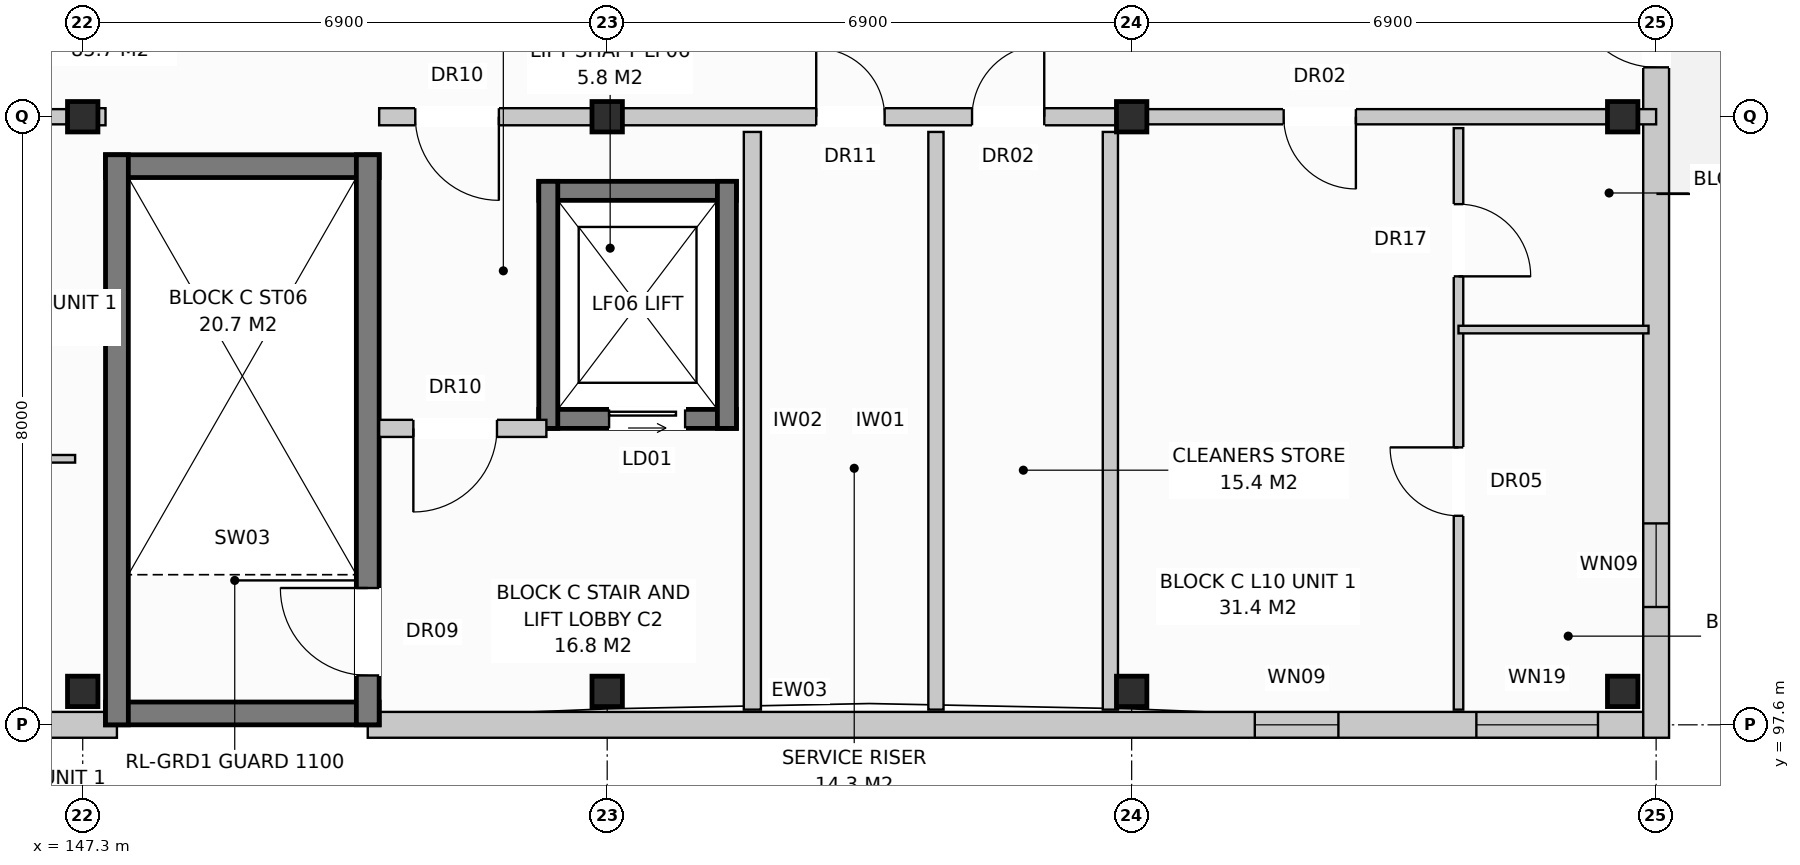
"""IFC4 building model, lengths in metres.
Left out: names, types, materials, properties, quantities, classifications, styles, units other than length and angle.
Written with IfcOpenShell. Run it as: python <this file> out.ifc"""

import sys

from ifc_helpers import new_model, si_unit, direction, frame, frame_2d, origin, origin_with_axes, origin_2d, place, context, subcontext, project, spatial, rectangle, extrude, element, fill, save


model = new_model("IFC4")
c1 = context("Model", 3, precision=1e-05, world=origin(), true_north=direction((0.0, 1.0)))
c2 = subcontext(c1, "Body", "Model", "MODEL_VIEW")
j1 = project(units=[si_unit("LENGTHUNIT", "METRE"), si_unit("PLANEANGLEUNIT", "RADIAN")], contexts=[c1])
p1 = place(None, origin())
s1 = spatial("IfcSite", under=j1, at=p1, CompositionType="ELEMENT")
p2 = place(p1, origin())
s2 = spatial("IfcBuilding", under=s1, at=p2, CompositionType="ELEMENT")
p3 = place(p2, frame((0.0, 0.0, 33.6)))
s3 = spatial("IfcBuildingStorey", under=s2, at=p3, CompositionType="ELEMENT", Elevation=33.6)
for number, where, z_axis, x_axis in (
    (1, (147.3, 98.04, 0.0), (0.0, 0.0, 1.0), (1.0, 0.0, 0.0)),
    (2, (147.3, 105.6, 0.0), (0.0, 0.0, 1.0), (1.0, 0.0, 0.0)),
    (3, (154.2, 98.04, 0.0), (0.0, 0.0, 1.0), (1.0, 0.0, 0.0)),
    (4, (154.2, 105.6, 0.0), (0.0, 0.0, 1.0), (1.0, 0.0, 0.0)),
    (5, (161.1, 98.04, 0.0), (0.0, 0.0, 1.0), (1.0, 0.0, 0.0)),
    (6, (161.1, 105.6, 0.0), (0.0, 0.0, 1.0), (1.0, 0.0, 0.0)),
    (7, (167.56, 98.04, 0.0), (0.0, 0.0, 1.0), (1.0, 0.0, 0.0)),
    (8, (167.56, 105.6, 0.0), (0.0, 0.0, 1.0), (1.0, 0.0, 0.0)),
):
    element("IfcColumn", number, at=place(p3, frame(where, z_axis=z_axis, x_axis=x_axis)), inside=s3, PredefinedType="COLUMN", context=c2, shape_type="SweptSolid", body=[
        extrude(rectangle(XDim=0.4, YDim=0.4, at=origin_2d()), origin(), (0.0, 0.0, 1.0), 3.2),
    ])
p4 = place(p3, frame((130.35, 97.6, 0.0), z_axis=(0.0, 0.0, 1.0), x_axis=(1.0, 0.0, 0.0)))
e9 = element("IfcWall", 9, at=p4, inside=s3, PredefinedType="STANDARD", context=c2, shape_type="SweptSolid", body=[
    extrude(rectangle(XDim=17.4, YDim=0.34, at=frame_2d((8.7, 0.0))), origin(), (0.0, 0.0, 1.0), 2.91),
])
p5 = place(p4, frame((11.844, 0.0, 0.0)))
e10 = element("IfcOpeningElement", 10, at=p5, cuts=e9, PredefinedType="OPENING", context=c2, shape_type="SweptSolid", body=[
    extrude(rectangle(XDim=1.05, YDim=2.12, at=frame_2d((0.525, 1.06))), frame((0.0, 0.182, 0.0), z_axis=(0.0, -1.0, 0.0), x_axis=(1.0, 0.0, 0.0)), (0.0, 0.0, 1.0), 0.364),
])
p6 = place(p4, frame((10.62, 0.0, 0.9)))
e11 = element("IfcOpeningElement", 11, at=p6, cuts=e9, PredefinedType="OPENING", context=c2, shape_type="SweptSolid", body=[
    extrude(rectangle(XDim=0.95, YDim=1.55, at=frame_2d((0.475, 0.775))), frame((0.0, 0.182, 0.0), z_axis=(0.0, -1.0, 0.0), x_axis=(1.0, 0.0, 0.0)), (0.0, 0.0, 1.0), 0.364),
])
p7 = place(p4, frame((14.87, 0.0, 0.72)))
e12 = element("IfcOpeningElement", 12, at=p7, cuts=e9, PredefinedType="OPENING", context=c2, shape_type="SweptSolid", body=[
    extrude(rectangle(XDim=1.1, YDim=1.5, at=frame_2d((0.55, 0.75))), frame((0.0, 0.182, 0.0), z_axis=(0.0, -1.0, 0.0), x_axis=(1.0, 0.0, 0.0)), (0.0, 0.0, 1.0), 0.364),
])
p8 = place(p3, frame((151.05, 97.6, 0.0), z_axis=(0.0, 0.0, 1.0), x_axis=(1.0, 0.0, 0.0)))
e13 = element("IfcWall", 13, at=p8, inside=s3, PredefinedType="STANDARD", context=c2, shape_type="SweptSolid", body=[
    extrude(rectangle(XDim=16.79, YDim=0.34, at=frame_2d((8.395, 0.0))), origin(), (0.0, 0.0, 1.0), 2.91),
])
p9 = place(p8, frame((11.67, 0.0, 0.72)))
e14 = element("IfcOpeningElement", 14, at=p9, cuts=e13, PredefinedType="OPENING", context=c2, shape_type="SweptSolid", body=[
    extrude(rectangle(XDim=1.1, YDim=1.5, at=frame_2d((0.55, 0.75))), frame((0.0, 0.182, 0.0), z_axis=(0.0, -1.0, 0.0), x_axis=(1.0, 0.0, 0.0)), (0.0, 0.0, 1.0), 0.364),
])
p10 = place(p8, frame((14.585, 0.0, 0.8)))
e15 = element("IfcOpeningElement", 15, at=p10, cuts=e13, PredefinedType="OPENING", context=c2, shape_type="SweptSolid", body=[
    extrude(rectangle(XDim=1.6, YDim=1.85, at=frame_2d((0.8, 0.925))), frame((0.0, 0.182, 0.0), z_axis=(0.0, -1.0, 0.0), x_axis=(1.0, 0.0, 0.0)), (0.0, 0.0, 1.0), 0.364),
])
p11 = place(p3, frame((168.0, 97.43, 0.0), z_axis=(0.0, 0.0, 1.0), x_axis=(0.0, 1.0, 0.0)))
e16 = element("IfcWall", 16, at=p11, inside=s3, PredefinedType="STANDARD", context=c2, shape_type="SweptSolid", body=[
    extrude(rectangle(XDim=18.74, YDim=0.34, at=frame_2d((9.37, 0.0))), origin(), (0.0, 0.0, 1.0), 2.91),
])
p12 = place(p11, frame((8.82, 0.0, 0.0)))
e17 = element("IfcOpeningElement", 17, at=p12, cuts=e16, PredefinedType="OPENING", context=c2, shape_type="SweptSolid", body=[
    extrude(rectangle(XDim=1.1, YDim=2.1, at=frame_2d((0.55, 1.05))), frame((0.0, 0.182, 0.0), z_axis=(0.0, -1.0, 0.0), x_axis=(1.0, 0.0, 0.0)), (0.0, 0.0, 1.0), 0.364),
])
p13 = place(p11, frame((1.72, 0.0, 0.72)))
e18 = element("IfcOpeningElement", 18, at=p13, cuts=e16, PredefinedType="OPENING", context=c2, shape_type="SweptSolid", body=[
    extrude(rectangle(XDim=1.1, YDim=1.5, at=frame_2d((0.55, 0.75))), frame((0.0, 0.182, 0.0), z_axis=(0.0, -1.0, 0.0), x_axis=(1.0, 0.0, 0.0)), (0.0, 0.0, 1.0), 0.364),
])
p14 = place(p11, frame((15.92, 0.0, 0.72)))
e19 = element("IfcOpeningElement", 19, at=p14, cuts=e16, PredefinedType="OPENING", context=c2, shape_type="SweptSolid", body=[
    extrude(rectangle(XDim=1.1, YDim=1.5, at=frame_2d((0.55, 0.75))), frame((0.0, 0.182, 0.0), z_axis=(0.0, -1.0, 0.0), x_axis=(1.0, 0.0, 0.0)), (0.0, 0.0, 1.0), 0.364),
])
for number, where, z_axis, x_axis in (
    (20, (147.6, 97.75, 0.0), (0.0, 0.0, 1.0), (1.0, 0.0, 0.0)),
    (21, (147.6, 104.95, 0.0), (0.0, 0.0, 1.0), (1.0, 0.0, 0.0)),
):
    element("IfcWall", number, at=place(p3, frame(where, z_axis=z_axis, x_axis=x_axis)), inside=s3, PredefinedType="SHEAR", context=c2, shape_type="SweptSolid", body=[
        extrude(rectangle(XDim=3.6, YDim=0.3, at=frame_2d((1.8, 0.0))), origin(), (0.0, 0.0, 1.0), 2.96),
    ])
p15 = place(p3, frame((147.75, 97.6, 0.0), z_axis=(0.0, 0.0, 1.0), x_axis=(0.0, 1.0, 0.0)))
e22 = element("IfcWall", 22, at=p15, inside=s3, PredefinedType="SHEAR", context=c2, shape_type="SweptSolid", body=[
    extrude(rectangle(XDim=7.5, YDim=0.3, at=frame_2d((3.75, 0.0))), origin(), (0.0, 0.0, 1.0), 2.96),
])
p16 = place(p3, frame((151.05, 97.6, 0.0), z_axis=(0.0, 0.0, 1.0), x_axis=(0.0, 1.0, 0.0)))
e23 = element("IfcWall", 23, at=p16, inside=s3, PredefinedType="SHEAR", context=c2, shape_type="SweptSolid", body=[
    extrude(rectangle(XDim=7.5, YDim=0.3, at=frame_2d((3.75, 0.0))), origin(), (0.0, 0.0, 1.0), 2.96),
])
p17 = place(p16, frame((0.65, 0.0, 0.0)))
e24 = element("IfcOpeningElement", 24, at=p17, cuts=e23, PredefinedType="OPENING", context=c2, shape_type="SweptSolid", body=[
    extrude(rectangle(XDim=1.15, YDim=2.15, at=frame_2d((0.575, 1.075))), frame((0.0, 0.162, 0.0), z_axis=(0.0, -1.0, 0.0), x_axis=(1.0, 0.0, 0.0)), (0.0, 0.0, 1.0), 0.324),
])
p18 = place(p3, frame((153.3, 101.625, 0.0), z_axis=(0.0, 0.0, 1.0), x_axis=(1.0, 0.0, 0.0)))
e25 = element("IfcWall", 25, at=p18, inside=s3, PredefinedType="SHEAR", context=c2, shape_type="SweptSolid", body=[
    extrude(rectangle(XDim=2.6, YDim=0.25, at=frame_2d((1.3, 0.0))), origin(), (0.0, 0.0, 1.0), 2.96),
])
p19 = place(p18, frame((0.925, 0.0, 0.0)))
e26 = element("IfcOpeningElement", 26, at=p19, cuts=e25, PredefinedType="OPENING", context=c2, shape_type="SweptSolid", body=[
    extrude(rectangle(XDim=1.0, YDim=2.1, at=frame_2d((0.5, 1.05))), frame((0.0, 0.137, 0.0), z_axis=(0.0, -1.0, 0.0), x_axis=(1.0, 0.0, 0.0)), (0.0, 0.0, 1.0), 0.274),
])
p20 = place(p3, frame((153.3, 104.625, 0.0), z_axis=(0.0, 0.0, 1.0), x_axis=(1.0, 0.0, 0.0)))
e27 = element("IfcWall", 27, at=p20, inside=s3, PredefinedType="SHEAR", context=c2, shape_type="SweptSolid", body=[
    extrude(rectangle(XDim=2.6, YDim=0.25, at=frame_2d((1.3, 0.0))), origin(), (0.0, 0.0, 1.0), 2.96),
])
for number, where, z_axis, x_axis in (
    (28, (153.425, 101.5, 0.0), (0.0, 0.0, 1.0), (0.0, 1.0, 0.0)),
    (29, (155.775, 101.5, 0.0), (0.0, 0.0, 1.0), (0.0, 1.0, 0.0)),
):
    element("IfcWall", number, at=place(p3, frame(where, z_axis=z_axis, x_axis=x_axis)), inside=s3, PredefinedType="SHEAR", context=c2, shape_type="SweptSolid", body=[
        extrude(rectangle(XDim=3.25, YDim=0.25, at=frame_2d((1.625, 0.0))), origin(), (0.0, 0.0, 1.0), 2.96),
    ])
p21 = place(p3, frame((156.11, 97.8, 0.0), z_axis=(0.0, 0.0, 1.0), x_axis=(0.0, 1.0, 0.0)))
e30 = element("IfcWall", 30, at=p21, inside=s3, PredefinedType="PARTITIONING", context=c2, shape_type="SweptSolid", body=[
    extrude(rectangle(XDim=7.6, YDim=0.225, at=frame_2d((3.8, 0.0))), origin(), (0.0, 0.0, 1.0), 2.59),
])
p22 = place(p3, frame((151.2, 101.5, 0.0), z_axis=(0.0, 0.0, 1.0), x_axis=(1.0, 0.0, 0.0)))
e31 = element("IfcWall", 31, at=p22, inside=s3, PredefinedType="PARTITIONING", context=c2, shape_type="SweptSolid", body=[
    extrude(rectangle(XDim=2.2, YDim=0.225, at=frame_2d((1.1, 0.0))), origin(), (0.0, 0.0, 1.0), 2.96),
])
p23 = place(p22, frame((0.45, 0.0, 0.0)))
e32 = element("IfcOpeningElement", 32, at=p23, cuts=e31, PredefinedType="OPENING", context=c2, shape_type="SweptSolid", body=[
    extrude(rectangle(XDim=1.1, YDim=2.15, at=frame_2d((0.55, 1.075))), frame((0.0, 0.125, 0.0), z_axis=(0.0, -1.0, 0.0), x_axis=(1.0, 0.0, 0.0)), (0.0, 0.0, 1.0), 0.249),
])
p24 = place(p3, frame((147.3, 105.6, 0.0), z_axis=(0.0, 0.0, 1.0), x_axis=(1.0, 0.0, 0.0)))
e33 = element("IfcWall", 33, at=p24, inside=s3, PredefinedType="PARTITIONING", context=c2, shape_type="SweptSolid", body=[
    extrude(rectangle(XDim=0.3, YDim=0.225, at=frame_2d((0.15, 0.0))), origin(), (0.0, 0.0, 1.0), 2.96),
])
p25 = place(p3, frame((158.525, 97.8, 0.0), z_axis=(0.0, 0.0, 1.0), x_axis=(0.0, 1.0, 0.0)))
e34 = element("IfcWall", 34, at=p25, inside=s3, PredefinedType="PARTITIONING", context=c2, shape_type="SweptSolid", body=[
    extrude(rectangle(XDim=7.6, YDim=0.2, at=frame_2d((3.8, 0.0))), origin(), (0.0, 0.0, 1.0), 2.96),
])
p26 = place(p3, frame((160.82, 97.8, 0.0), z_axis=(0.0, 0.0, 1.0), x_axis=(0.0, 1.0, 0.0)))
e35 = element("IfcWall", 35, at=p26, inside=s3, PredefinedType="PARTITIONING", context=c2, shape_type="SweptSolid", body=[
    extrude(rectangle(XDim=7.6, YDim=0.2, at=frame_2d((3.8, 0.0))), origin(), (0.0, 0.0, 1.0), 2.35),
])
p27 = place(p3, frame((151.2, 105.6, 0.0), z_axis=(0.0, 0.0, 1.0), x_axis=(1.0, 0.0, 0.0)))
e36 = element("IfcWall", 36, at=p27, inside=s3, PredefinedType="PARTITIONING", context=c2, shape_type="SweptSolid", body=[
    extrude(rectangle(XDim=9.9, YDim=0.225, at=frame_2d((4.95, 0.0))), origin(), (0.0, 0.0, 1.0), 2.35),
])
p28 = place(p27, frame((0.475, 0.0, 0.0)))
e37 = element("IfcOpeningElement", 37, at=p28, cuts=e36, PredefinedType="OPENING", context=c2, shape_type="SweptSolid", body=[
    extrude(rectangle(XDim=1.1, YDim=2.15, at=frame_2d((0.55, 1.075))), frame((0.0, 0.125, 0.0), z_axis=(0.0, -1.0, 0.0), x_axis=(1.0, 0.0, 0.0)), (0.0, 0.0, 1.0), 0.249),
])
p29 = place(p27, frame((5.75, 0.0, 0.0)))
e38 = element("IfcOpeningElement", 38, at=p29, cuts=e36, PredefinedType="OPENING", context=c2, shape_type="SweptSolid", body=[
    extrude(rectangle(XDim=0.9, YDim=2.1, at=frame_2d((0.45, 1.05))), frame((0.0, 0.125, 0.0), z_axis=(0.0, -1.0, 0.0), x_axis=(1.0, 0.0, 0.0)), (0.0, 0.0, 1.0), 0.249),
])
p30 = place(p27, frame((7.8, 0.0, 0.0)))
e39 = element("IfcOpeningElement", 39, at=p30, cuts=e36, PredefinedType="OPENING", context=c2, shape_type="SweptSolid", body=[
    extrude(rectangle(XDim=0.95, YDim=2.15, at=frame_2d((0.475, 1.075))), frame((0.0, 0.125, 0.0), z_axis=(0.0, -1.0, 0.0), x_axis=(1.0, 0.0, 0.0)), (0.0, 0.0, 1.0), 0.249),
])
p31 = place(p3, frame((140.4, 105.6, 0.0), z_axis=(0.0, 0.0, 1.0), x_axis=(1.0, 0.0, 0.0)))
e40 = element("IfcWall", 40, at=p31, inside=s3, PredefinedType="PARTITIONING", context=c2, shape_type="SweptSolid", body=[
    extrude(rectangle(XDim=6.9, YDim=0.2, at=frame_2d((3.45, 0.0))), origin(), (0.0, 0.0, 1.0), 2.35),
])
p32 = place(p31, frame((2.0, 0.0, 0.0)))
e41 = element("IfcOpeningElement", 41, at=p32, cuts=e40, PredefinedType="OPENING", context=c2, shape_type="SweptSolid", body=[
    extrude(rectangle(XDim=0.95, YDim=2.15, at=frame_2d((0.475, 1.075))), frame((0.0, 0.112, 0.0), z_axis=(0.0, -1.0, 0.0), x_axis=(1.0, 0.0, 0.0)), (0.0, 0.0, 1.0), 0.224),
])
for number, where, z_axis, x_axis in (
    (42, (144.3, 103.2, 0.0), (0.0, 0.0, 1.0), (1.0, 0.0, 0.0)),
    (43, (144.3, 101.1, 0.0), (0.0, 0.0, 1.0), (1.0, 0.0, 0.0)),
):
    element("IfcWall", number, at=place(p3, frame(where, z_axis=z_axis, x_axis=x_axis)), inside=s3, PredefinedType="PARTITIONING", context=c2, shape_type="SweptSolid", body=[
        extrude(rectangle(XDim=2.9, YDim=0.1, at=frame_2d((1.45, 0.0))), origin(), (0.0, 0.0, 1.0), 2.96),
    ])
p33 = place(p3, frame((161.1, 105.6, 0.0), z_axis=(0.0, 0.0, 1.0), x_axis=(1.0, 0.0, 0.0)))
e44 = element("IfcWall", 44, at=p33, inside=s3, PredefinedType="PARTITIONING", context=c2, shape_type="SweptSolid", body=[
    extrude(rectangle(XDim=6.9, YDim=0.2, at=frame_2d((3.45, 0.0))), origin(), (0.0, 0.0, 1.0), 2.35),
])
p34 = place(p33, frame((2.0, 0.0, 0.0)))
e45 = element("IfcOpeningElement", 45, at=p34, cuts=e44, PredefinedType="OPENING", context=c2, shape_type="SweptSolid", body=[
    extrude(rectangle(XDim=0.95, YDim=2.15, at=frame_2d((0.475, 1.075))), frame((0.0, 0.112, 0.0), z_axis=(0.0, -1.0, 0.0), x_axis=(1.0, 0.0, 0.0)), (0.0, 0.0, 1.0), 0.224),
])
p35 = place(p3, frame((165.4, 105.45, 0.0), z_axis=(0.0, 0.0, 1.0), x_axis=(0.0, -1.0, 0.0)))
e46 = element("IfcWall", 46, at=p35, inside=s3, PredefinedType="PARTITIONING", context=c2, shape_type="SweptSolid", body=[
    extrude(rectangle(XDim=7.65, YDim=0.125, at=frame_2d((3.825, 0.0))), origin(), (0.0, 0.0, 1.0), 2.96),
])
p36 = place(p35, frame((1.0, 0.0, 0.0)))
e47 = element("IfcOpeningElement", 47, at=p36, cuts=e46, PredefinedType="OPENING", context=c2, shape_type="SweptSolid", body=[
    extrude(rectangle(XDim=0.95, YDim=2.1, at=frame_2d((0.475, 1.05))), frame((0.0, 0.074, 0.0), z_axis=(0.0, -1.0, 0.0), x_axis=(1.0, 0.0, 0.0)), (0.0, 0.0, 1.0), 0.149),
])
p37 = place(p35, frame((4.2, 0.0, 0.0)))
e48 = element("IfcOpeningElement", 48, at=p37, cuts=e46, PredefinedType="OPENING", context=c2, shape_type="SweptSolid", body=[
    extrude(rectangle(XDim=0.9, YDim=2.1, at=frame_2d((0.45, 1.05))), frame((0.0, 0.074, 0.0), z_axis=(0.0, -1.0, 0.0), x_axis=(1.0, 0.0, 0.0)), (0.0, 0.0, 1.0), 0.149),
])
p38 = place(p3, frame((165.4, 102.8, 0.0), z_axis=(0.0, 0.0, 1.0), x_axis=(1.0, 0.0, 0.0)))
e49 = element("IfcWall", 49, at=p38, inside=s3, PredefinedType="PARTITIONING", context=c2, shape_type="SweptSolid", body=[
    extrude(rectangle(XDim=2.5, YDim=0.1, at=frame_2d((1.25, 0.0))), origin(), (0.0, 0.0, 1.0), 2.96),
])
p39 = place(p9, origin_with_axes())
e50 = element("IfcWindow", 50, at=p39, inside=s3, PartitioningType="SINGLE_PANEL", PredefinedType="WINDOW", context=c2, shape_type="SweptSolid", body=[
    extrude(rectangle(XDim=1.1, YDim=1.5, at=frame_2d((0.55, 0.75))), frame((0.0, 0.03, 0.0), z_axis=(0.0, -1.0, 0.0), x_axis=(1.0, 0.0, 0.0)), (0.0, 0.0, 1.0), 0.06),
])
fill(e14, e50)
p40 = place(p10, origin_with_axes())
e51 = element("IfcWindow", 51, at=p40, inside=s3, PartitioningType="SINGLE_PANEL", PredefinedType="WINDOW", context=c2, shape_type="SweptSolid", body=[
    extrude(rectangle(XDim=1.6, YDim=1.85, at=frame_2d((0.8, 0.925))), frame((0.0, 0.03, 0.0), z_axis=(0.0, -1.0, 0.0), x_axis=(1.0, 0.0, 0.0)), (0.0, 0.0, 1.0), 0.06),
])
fill(e15, e51)
p41 = place(p12, origin_with_axes())
e52 = element("IfcDoor", 52, at=p41, inside=s3, OperationType="SINGLE_SWING_RIGHT", PredefinedType="DOOR", context=c2, shape_type="SweptSolid", body=[
    extrude(rectangle(XDim=1.1, YDim=2.1, at=frame_2d((0.55, 1.05))), frame((0.0, 0.025, 0.0), z_axis=(0.0, -1.0, 0.0), x_axis=(1.0, 0.0, 0.0)), (0.0, 0.0, 1.0), 0.05),
])
fill(e17, e52)
p42 = place(p13, origin_with_axes())
e53 = element("IfcWindow", 53, at=p42, inside=s3, PartitioningType="SINGLE_PANEL", PredefinedType="WINDOW", context=c2, shape_type="SweptSolid", body=[
    extrude(rectangle(XDim=1.1, YDim=1.5, at=frame_2d((0.55, 0.75))), frame((0.0, 0.03, 0.0), z_axis=(0.0, -1.0, 0.0), x_axis=(1.0, 0.0, 0.0)), (0.0, 0.0, 1.0), 0.06),
])
fill(e18, e53)
p43 = place(p17, origin_with_axes())
e54 = element("IfcDoor", 54, at=p43, inside=s3, OperationType="SINGLE_SWING_RIGHT", PredefinedType="DOOR", context=c2, shape_type="SweptSolid", body=[
    extrude(rectangle(XDim=1.15, YDim=2.15, at=frame_2d((0.575, 1.075))), frame((0.0, 0.025, 0.0), z_axis=(0.0, -1.0, 0.0), x_axis=(1.0, 0.0, 0.0)), (0.0, 0.0, 1.0), 0.05),
])
fill(e24, e54)
p44 = place(p19, origin_with_axes())
e55 = element("IfcDoor", 55, at=p44, inside=s3, OperationType="SLIDING_TO_LEFT", PredefinedType="DOOR", context=c2, shape_type="SweptSolid", body=[
    extrude(rectangle(XDim=1.0, YDim=2.1, at=frame_2d((0.5, 1.05))), frame((0.0, 0.025, 0.0), z_axis=(0.0, -1.0, 0.0), x_axis=(1.0, 0.0, 0.0)), (0.0, 0.0, 1.0), 0.05),
])
fill(e26, e55)
p45 = place(p23, frame((1.1, 0.0, 0.0), z_axis=(0.0, 0.0, 1.0), x_axis=(-1.0, 0.0, 0.0)))
e56 = element("IfcDoor", 56, at=p45, inside=s3, OperationType="SINGLE_SWING_LEFT", PredefinedType="DOOR", context=c2, shape_type="SweptSolid", body=[
    extrude(rectangle(XDim=1.1, YDim=2.15, at=frame_2d((0.55, 1.075))), frame((0.0, 0.025, 0.0), z_axis=(0.0, -1.0, 0.0), x_axis=(1.0, 0.0, 0.0)), (0.0, 0.0, 1.0), 0.05),
])
fill(e32, e56)
p46 = place(p28, frame((1.1, 0.0, 0.0), z_axis=(0.0, 0.0, 1.0), x_axis=(-1.0, 0.0, 0.0)))
e57 = element("IfcDoor", 57, at=p46, inside=s3, OperationType="SINGLE_SWING_RIGHT", PredefinedType="DOOR", context=c2, shape_type="SweptSolid", body=[
    extrude(rectangle(XDim=1.1, YDim=2.15, at=frame_2d((0.55, 1.075))), frame((0.0, 0.025, 0.0), z_axis=(0.0, -1.0, 0.0), x_axis=(1.0, 0.0, 0.0)), (0.0, 0.0, 1.0), 0.05),
])
fill(e37, e57)
p47 = place(p29, origin_with_axes())
e58 = element("IfcDoor", 58, at=p47, inside=s3, OperationType="SINGLE_SWING_LEFT", PredefinedType="DOOR", context=c2, shape_type="SweptSolid", body=[
    extrude(rectangle(XDim=0.9, YDim=2.1, at=frame_2d((0.45, 1.05))), frame((0.0, 0.025, 0.0), z_axis=(0.0, -1.0, 0.0), x_axis=(1.0, 0.0, 0.0)), (0.0, 0.0, 1.0), 0.05),
])
fill(e38, e58)
p48 = place(p30, origin_with_axes())
e59 = element("IfcDoor", 59, at=p48, inside=s3, OperationType="SINGLE_SWING_RIGHT", PredefinedType="DOOR", context=c2, shape_type="SweptSolid", body=[
    extrude(rectangle(XDim=0.95, YDim=2.15, at=frame_2d((0.475, 1.075))), frame((0.0, 0.025, 0.0), z_axis=(0.0, -1.0, 0.0), x_axis=(1.0, 0.0, 0.0)), (0.0, 0.0, 1.0), 0.05),
])
fill(e39, e59)
p49 = place(p34, frame((0.95, 0.0, 0.0), z_axis=(0.0, 0.0, 1.0), x_axis=(-1.0, 0.0, 0.0)))
e60 = element("IfcDoor", 60, at=p49, inside=s3, OperationType="SINGLE_SWING_RIGHT", PredefinedType="DOOR", context=c2, shape_type="SweptSolid", body=[
    extrude(rectangle(XDim=0.95, YDim=2.15, at=frame_2d((0.475, 1.075))), frame((0.0, 0.025, 0.0), z_axis=(0.0, -1.0, 0.0), x_axis=(1.0, 0.0, 0.0)), (0.0, 0.0, 1.0), 0.05),
])
fill(e45, e60)
p50 = place(p36, origin_with_axes())
e61 = element("IfcDoor", 61, at=p50, inside=s3, OperationType="SINGLE_SWING_RIGHT", PredefinedType="DOOR", context=c2, shape_type="SweptSolid", body=[
    extrude(rectangle(XDim=0.95, YDim=2.1, at=frame_2d((0.475, 1.05))), frame((0.0, 0.025, 0.0), z_axis=(0.0, -1.0, 0.0), x_axis=(1.0, 0.0, 0.0)), (0.0, 0.0, 1.0), 0.05),
])
fill(e47, e61)
p51 = place(p37, frame((0.9, 0.0, 0.0), z_axis=(0.0, 0.0, 1.0), x_axis=(-1.0, 0.0, 0.0)))
e62 = element("IfcDoor", 62, at=p51, inside=s3, OperationType="SINGLE_SWING_LEFT", PredefinedType="DOOR", context=c2, shape_type="SweptSolid", body=[
    extrude(rectangle(XDim=0.9, YDim=2.1, at=frame_2d((0.45, 1.05))), frame((0.0, 0.025, 0.0), z_axis=(0.0, -1.0, 0.0), x_axis=(1.0, 0.0, 0.0)), (0.0, 0.0, 1.0), 0.05),
])
fill(e48, e62)
save(model, sys.argv[1])
